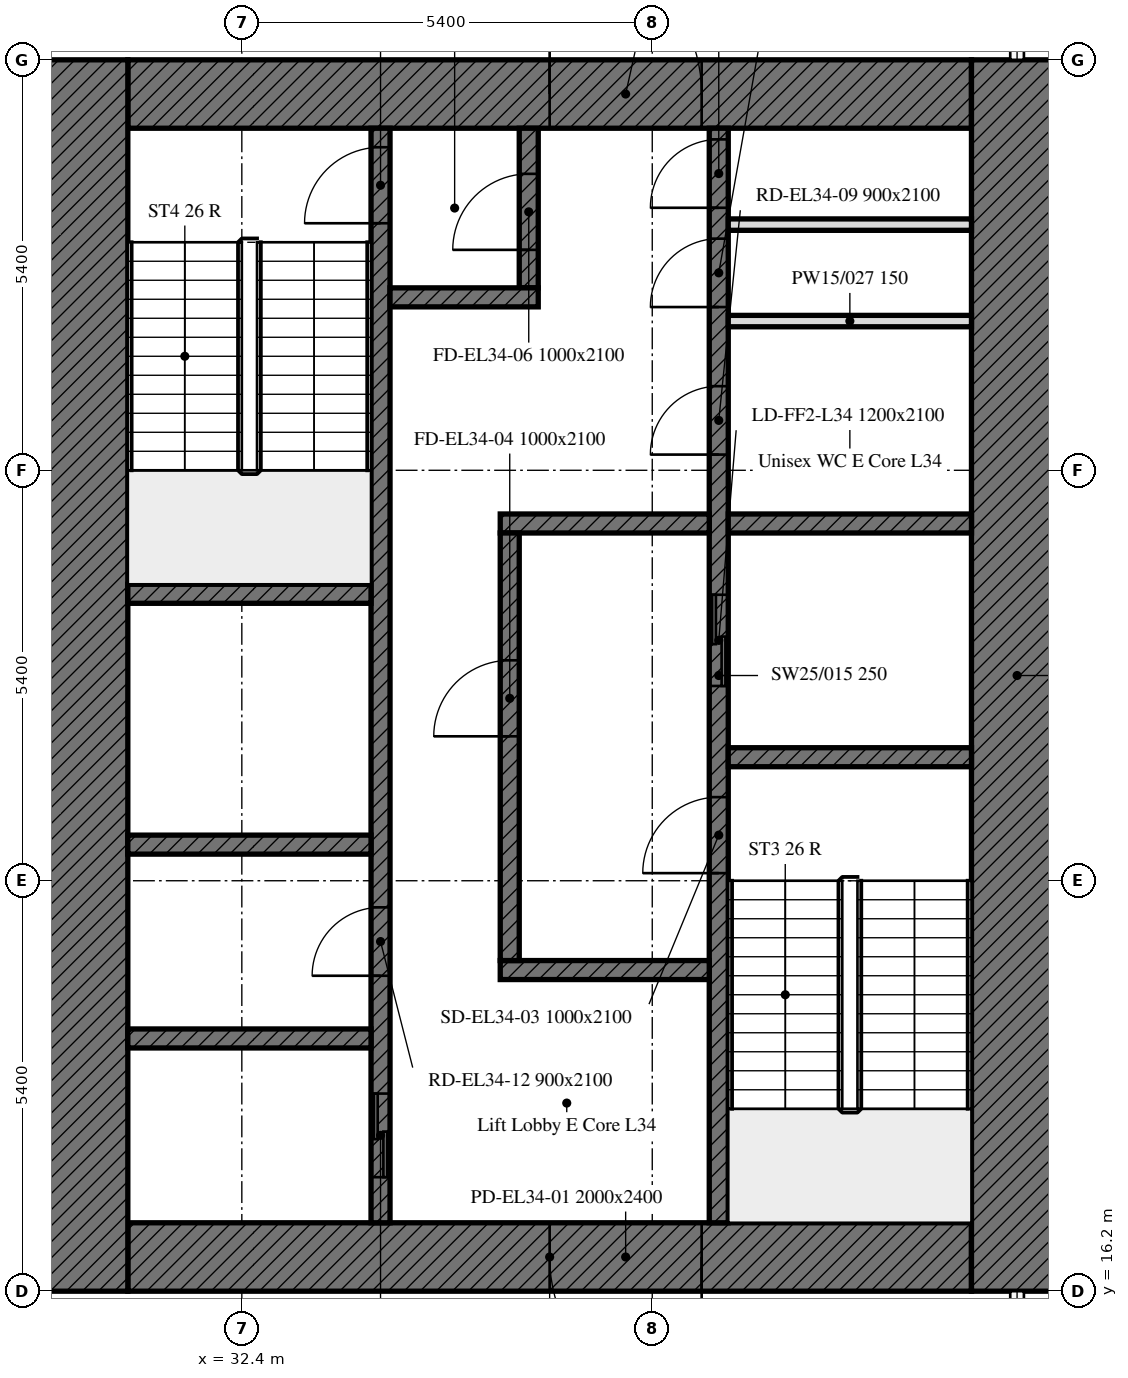
"""IFC4 building model, lengths in metres.
Left out: names, types, materials, properties, quantities, classifications, styles, units other than length and angle.
Written with IfcOpenShell. Run it as: python <this file> out.ifc"""

import sys

from ifc_helpers import new_model, si_unit, direction, frame, frame_2d, origin, place, context, subcontext, project, spatial, rectangle, extrude, element, fill, save


model = new_model("IFC4")
c1 = context("Model", 3, precision=1e-05, world=origin(), true_north=direction((0.0, 1.0)))
c2 = subcontext(c1, "Body", "Model", "MODEL_VIEW")
j1 = project(units=[si_unit("LENGTHUNIT", "METRE"), si_unit("PLANEANGLEUNIT", "RADIAN")], contexts=[c1])
p1 = place(None, origin())
s1 = spatial("IfcSite", under=j1, at=p1, CompositionType="ELEMENT")
p2 = place(p1, origin())
s2 = spatial("IfcBuilding", under=s1, at=p2, CompositionType="ELEMENT")
p3 = place(p2, frame((0.0, 0.0, 148.0)))
s3 = spatial("IfcBuildingStorey", under=s2, at=p3, CompositionType="ELEMENT", Elevation=148.0)
p4 = place(p3, frame((42.0, 16.65, 0.0), z_axis=(0.0, 0.0, 1.0), x_axis=(-1.0, 0.0, 0.0)))
e1 = element("IfcWall", 1, at=p4, inside=s3, PredefinedType="SOLIDWALL", context=c2, shape_type="SweptSolid", body=[
    extrude(rectangle(XDim=11.1, YDim=0.9, at=frame_2d((5.55, 0.0))), origin(), (0.0, 0.0, 1.0), 4.5),
])
p5 = place(p4, frame((3.55, 0.0, 0.0)))
e2 = element("IfcOpeningElement", 2, at=p5, cuts=e1, PredefinedType="OPENING", context=c2, shape_type="SweptSolid", body=[
    extrude(rectangle(XDim=2.0, YDim=2.4, at=frame_2d((1.0, 1.2))), frame((0.0, 0.45, 0.0), z_axis=(0.0, -1.0, 0.0), x_axis=(1.0, 0.0, 0.0)), (0.0, 0.0, 1.0), 0.9),
])
p6 = place(p3, frame((30.9, 31.95, 0.0), z_axis=(0.0, 0.0, 1.0), x_axis=(1.0, 0.0, 0.0)))
e3 = element("IfcWall", 3, at=p6, inside=s3, PredefinedType="SOLIDWALL", context=c2, shape_type="SweptSolid", body=[
    extrude(rectangle(XDim=11.1, YDim=0.9, at=frame_2d((5.55, 0.0))), origin(), (0.0, 0.0, 1.0), 4.5),
])
p7 = place(p6, frame((5.55, 0.0, 0.0)))
e4 = element("IfcOpeningElement", 4, at=p7, cuts=e3, PredefinedType="OPENING", context=c2, shape_type="SweptSolid", body=[
    extrude(rectangle(XDim=2.0, YDim=2.4, at=frame_2d((1.0, 1.2))), frame((0.0, 0.45, 0.0), z_axis=(0.0, -1.0, 0.0), x_axis=(1.0, 0.0, 0.0)), (0.0, 0.0, 1.0), 0.9),
])
for number, where, z_axis, x_axis in (
    (5, (42.6, 32.4, 0.0), (0.0, 0.0, 1.0), (0.0, -1.0, 0.0)),
    (6, (30.3, 16.2, 0.0), (0.0, 0.0, 1.0), (0.0, 1.0, 0.0)),
):
    element("IfcWall", number, at=place(p3, frame(where, z_axis=z_axis, x_axis=x_axis)), inside=s3, PredefinedType="SOLIDWALL", context=c2, shape_type="SweptSolid", body=[
        extrude(rectangle(XDim=16.2, YDim=1.2, at=frame_2d((8.1, 0.0))), origin(), (0.0, 0.0, 1.0), 4.5),
    ])
p8 = place(p3, frame((38.675, 17.1, 0.0), z_axis=(0.0, 0.0, 1.0), x_axis=(0.0, 1.0, 0.0)))
e7 = element("IfcWall", 7, at=p8, inside=s3, PredefinedType="SOLIDWALL", context=c2, shape_type="SweptSolid", body=[
    extrude(rectangle(XDim=14.4, YDim=0.25, at=frame_2d((7.2, 0.0))), origin(), (0.0, 0.0, 1.0), 4.5),
])
p9 = place(p8, frame((4.6, 0.0, 0.0)))
e8 = element("IfcOpeningElement", 8, at=p9, cuts=e7, PredefinedType="OPENING", context=c2, shape_type="SweptSolid", body=[
    extrude(rectangle(XDim=1.0, YDim=2.1, at=frame_2d((0.5, 1.05))), frame((0.0, 0.125, 0.0), z_axis=(0.0, -1.0, 0.0), x_axis=(1.0, 0.0, 0.0)), (0.0, 0.0, 1.0), 0.25),
])
p10 = place(p8, frame((7.062, 0.0, 0.0)))
e9 = element("IfcOpeningElement", 9, at=p10, cuts=e7, PredefinedType="OPENING", context=c2, shape_type="SweptSolid", body=[
    extrude(rectangle(XDim=1.2, YDim=2.1, at=frame_2d((0.6, 1.05))), frame((0.0, 0.125, 0.0), z_axis=(0.0, -1.0, 0.0), x_axis=(1.0, 0.0, 0.0)), (0.0, 0.0, 1.0), 0.25),
])
p11 = place(p8, frame((10.106, 0.0, 0.0)))
e10 = element("IfcOpeningElement", 10, at=p11, cuts=e7, PredefinedType="OPENING", context=c2, shape_type="SweptSolid", body=[
    extrude(rectangle(XDim=0.9, YDim=2.1, at=frame_2d((0.45, 1.05))), frame((0.0, 0.125, 0.0), z_axis=(0.0, -1.0, 0.0), x_axis=(1.0, 0.0, 0.0)), (0.0, 0.0, 1.0), 0.25),
])
p12 = place(p8, frame((12.048, 0.0, 0.0)))
e11 = element("IfcOpeningElement", 11, at=p12, cuts=e7, PredefinedType="OPENING", context=c2, shape_type="SweptSolid", body=[
    extrude(rectangle(XDim=0.9, YDim=2.1, at=frame_2d((0.45, 1.05))), frame((0.0, 0.125, 0.0), z_axis=(0.0, -1.0, 0.0), x_axis=(1.0, 0.0, 0.0)), (0.0, 0.0, 1.0), 0.25),
])
p13 = place(p8, frame((13.354, 0.0, 0.0)))
e12 = element("IfcOpeningElement", 12, at=p13, cuts=e7, PredefinedType="OPENING", context=c2, shape_type="SweptSolid", body=[
    extrude(rectangle(XDim=0.9, YDim=2.1, at=frame_2d((0.45, 1.05))), frame((0.0, 0.125, 0.0), z_axis=(0.0, -1.0, 0.0), x_axis=(1.0, 0.0, 0.0)), (0.0, 0.0, 1.0), 0.25),
])
p14 = place(p3, frame((34.225, 17.1, 0.0), z_axis=(0.0, 0.0, 1.0), x_axis=(0.0, 1.0, 0.0)))
e13 = element("IfcWall", 13, at=p14, inside=s3, PredefinedType="SOLIDWALL", context=c2, shape_type="SweptSolid", body=[
    extrude(rectangle(XDim=14.4, YDim=0.25, at=frame_2d((7.2, 0.0))), origin(), (0.0, 0.0, 1.0), 4.5),
])
p15 = place(p14, frame((13.15, 0.0, 0.0)))
e14 = element("IfcOpeningElement", 14, at=p15, cuts=e13, PredefinedType="OPENING", context=c2, shape_type="SweptSolid", body=[
    extrude(rectangle(XDim=1.0, YDim=2.1, at=frame_2d((0.5, 1.05))), frame((0.0, 0.125, 0.0), z_axis=(0.0, -1.0, 0.0), x_axis=(1.0, 0.0, 0.0)), (0.0, 0.0, 1.0), 0.25),
])
p16 = place(p14, frame((0.6, 0.0, 0.0)))
e15 = element("IfcOpeningElement", 15, at=p16, cuts=e13, PredefinedType="OPENING", context=c2, shape_type="SweptSolid", body=[
    extrude(rectangle(XDim=1.1, YDim=2.1, at=frame_2d((0.55, 1.05))), frame((0.0, 0.125, 0.0), z_axis=(0.0, -1.0, 0.0), x_axis=(1.0, 0.0, 0.0)), (0.0, 0.0, 1.0), 0.25),
])
p17 = place(p14, frame((3.25, 0.0, 0.0)))
e16 = element("IfcOpeningElement", 16, at=p17, cuts=e13, PredefinedType="OPENING", context=c2, shape_type="SweptSolid", body=[
    extrude(rectangle(XDim=0.9, YDim=2.1, at=frame_2d((0.45, 1.05))), frame((0.0, 0.125, 0.0), z_axis=(0.0, -1.0, 0.0), x_axis=(1.0, 0.0, 0.0)), (0.0, 0.0, 1.0), 0.25),
])
p18 = place(p3, frame((38.8, 23.225, 0.0), z_axis=(0.0, 0.0, 1.0), x_axis=(1.0, 0.0, 0.0)))
e17 = element("IfcWall", 17, at=p18, inside=s3, PredefinedType="SOLIDWALL", context=c2, shape_type="SweptSolid", body=[
    extrude(rectangle(XDim=3.2, YDim=0.25, at=frame_2d((1.6, 0.0))), origin(), (0.0, 0.0, 1.0), 4.5),
])
for number, where, z_axis, x_axis in (
    (18, (30.9, 25.375, 0.0), (0.0, 0.0, 1.0), (1.0, 0.0, 0.0)),
    (19, (30.9, 22.075, 0.0), (0.0, 0.0, 1.0), (1.0, 0.0, 0.0)),
):
    element("IfcWall", number, at=place(p3, frame(where, z_axis=z_axis, x_axis=x_axis)), inside=s3, PredefinedType="SOLIDWALL", context=c2, shape_type="SweptSolid", body=[
        extrude(rectangle(XDim=3.2, YDim=0.25, at=frame_2d((1.6, 0.0))), origin(), (0.0, 0.0, 1.0), 4.5),
    ])
p19 = place(p3, frame((38.8, 26.3, 0.0), z_axis=(0.0, 0.0, 1.0), x_axis=(1.0, 0.0, 0.0)))
e20 = element("IfcWall", 20, at=p19, inside=s3, PredefinedType="SOLIDWALL", context=c2, shape_type="SweptSolid", body=[
    extrude(rectangle(XDim=3.2, YDim=0.25, at=frame_2d((1.6, 0.0))), origin(), (0.0, 0.0, 1.0), 4.5),
])
for number, where, z_axis, x_axis in (
    (21, (35.8, 26.3, 0.0), (0.0, 0.0, 1.0), (1.0, 0.0, 0.0)),
    (22, (35.8, 20.425, 0.0), (0.0, 0.0, 1.0), (1.0, 0.0, 0.0)),
):
    element("IfcWall", number, at=place(p3, frame(where, z_axis=z_axis, x_axis=x_axis)), inside=s3, PredefinedType="SOLIDWALL", context=c2, shape_type="SweptSolid", body=[
        extrude(rectangle(XDim=2.75, YDim=0.25, at=frame_2d((1.375, 0.0))), origin(), (0.0, 0.0, 1.0), 4.5),
    ])
p20 = place(p3, frame((36.175, 29.4, 0.0), z_axis=(0.0, 0.0, 1.0), x_axis=(0.0, 1.0, 0.0)))
e23 = element("IfcWall", 23, at=p20, inside=s3, PredefinedType="SOLIDWALL", context=c2, shape_type="SweptSolid", body=[
    extrude(rectangle(XDim=2.1, YDim=0.25, at=frame_2d((1.05, 0.0))), origin(), (0.0, 0.0, 1.0), 4.5),
])
p21 = place(p20, frame((0.5, 0.0, 0.0)))
e24 = element("IfcOpeningElement", 24, at=p21, cuts=e23, PredefinedType="OPENING", context=c2, shape_type="SweptSolid", body=[
    extrude(rectangle(XDim=1.0, YDim=2.1, at=frame_2d((0.5, 1.05))), frame((0.0, 0.125, 0.0), z_axis=(0.0, -1.0, 0.0), x_axis=(1.0, 0.0, 0.0)), (0.0, 0.0, 1.0), 0.25),
])
p22 = place(p3, frame((34.35, 29.275, 0.0), z_axis=(0.0, 0.0, 1.0), x_axis=(1.0, 0.0, 0.0)))
e25 = element("IfcWall", 25, at=p22, inside=s3, PredefinedType="SOLIDWALL", context=c2, shape_type="SweptSolid", body=[
    extrude(rectangle(XDim=1.95, YDim=0.25, at=frame_2d((0.975, 0.0))), origin(), (0.0, 0.0, 1.0), 4.5),
])
p23 = place(p3, frame((35.925, 20.55, 0.0), z_axis=(0.0, 0.0, 1.0), x_axis=(0.0, 1.0, 0.0)))
e26 = element("IfcWall", 26, at=p23, inside=s3, PredefinedType="SOLIDWALL", context=c2, shape_type="SweptSolid", body=[
    extrude(rectangle(XDim=5.625, YDim=0.25, at=frame_2d((2.812, 0.0))), origin(), (0.0, 0.0, 1.0), 4.5),
])
p24 = place(p23, frame((2.95, 0.0, 0.0)))
e27 = element("IfcOpeningElement", 27, at=p24, cuts=e26, PredefinedType="OPENING", context=c2, shape_type="SweptSolid", body=[
    extrude(rectangle(XDim=1.0, YDim=2.1, at=frame_2d((0.5, 1.05))), frame((0.0, 0.125, 0.0), z_axis=(0.0, -1.0, 0.0), x_axis=(1.0, 0.0, 0.0)), (0.0, 0.0, 1.0), 0.25),
])
p25 = place(p3, frame((30.9, 19.525, 0.0), z_axis=(0.0, 0.0, 1.0), x_axis=(1.0, 0.0, 0.0)))
e28 = element("IfcWall", 28, at=p25, inside=s3, PredefinedType="SOLIDWALL", context=c2, shape_type="SweptSolid", body=[
    extrude(rectangle(XDim=3.2, YDim=0.25, at=frame_2d((1.6, 0.0))), origin(), (0.0, 0.0, 1.0), 4.5),
])
for number, where, z_axis, x_axis in (
    (29, (38.8, 28.963, 0.0), (0.0, 0.0, 1.0), (1.0, 0.0, 0.0)),
    (30, (38.8, 30.232, 0.0), (0.0, 0.0, 1.0), (1.0, 0.0, 0.0)),
):
    element("IfcWall", number, at=place(p3, frame(where, z_axis=z_axis, x_axis=x_axis)), inside=s3, PredefinedType="PARTITIONING", context=c2, shape_type="SweptSolid", body=[
        extrude(rectangle(XDim=3.2, YDim=0.15, at=frame_2d((1.6, 0.0))), origin(), (0.0, 0.0, 1.0), 4.5),
    ])
p26 = place(p5, origin())
e31 = element("IfcDoor", 31, at=p26, inside=s3, OperationType="DOUBLE_DOOR_SINGLE_SWING", PredefinedType="DOOR", context=c2, shape_type="SweptSolid", body=[
    extrude(rectangle(XDim=2.0, YDim=2.4, at=frame_2d((1.0, 1.2))), frame((0.0, 0.025, 0.0), z_axis=(0.0, -1.0, 0.0), x_axis=(1.0, 0.0, 0.0)), (0.0, 0.0, 1.0), 0.05),
])
fill(e2, e31)
p27 = place(p7, origin())
e32 = element("IfcDoor", 32, at=p27, inside=s3, OperationType="DOUBLE_DOOR_SINGLE_SWING", PredefinedType="DOOR", context=c2, shape_type="SweptSolid", body=[
    extrude(rectangle(XDim=2.0, YDim=2.4, at=frame_2d((1.0, 1.2))), frame((0.0, 0.025, 0.0), z_axis=(0.0, -1.0, 0.0), x_axis=(1.0, 0.0, 0.0)), (0.0, 0.0, 1.0), 0.05),
])
fill(e4, e32)
p28 = place(p9, origin())
e33 = element("IfcDoor", 33, at=p28, inside=s3, OperationType="SINGLE_SWING_LEFT", PredefinedType="DOOR", context=c2, shape_type="SweptSolid", body=[
    extrude(rectangle(XDim=1.0, YDim=2.1, at=frame_2d((0.5, 1.05))), frame((0.0, 0.025, 0.0), z_axis=(0.0, -1.0, 0.0), x_axis=(1.0, 0.0, 0.0)), (0.0, 0.0, 1.0), 0.05),
])
fill(e8, e33)
p29 = place(p24, origin())
e34 = element("IfcDoor", 34, at=p29, inside=s3, OperationType="SINGLE_SWING_LEFT", PredefinedType="DOOR", context=c2, shape_type="SweptSolid", body=[
    extrude(rectangle(XDim=1.0, YDim=2.1, at=frame_2d((0.5, 1.05))), frame((0.0, 0.025, 0.0), z_axis=(0.0, -1.0, 0.0), x_axis=(1.0, 0.0, 0.0)), (0.0, 0.0, 1.0), 0.05),
])
fill(e27, e34)
p30 = place(p15, origin())
e35 = element("IfcDoor", 35, at=p30, inside=s3, OperationType="SINGLE_SWING_LEFT", PredefinedType="DOOR", context=c2, shape_type="SweptSolid", body=[
    extrude(rectangle(XDim=1.0, YDim=2.1, at=frame_2d((0.5, 1.05))), frame((0.0, 0.025, 0.0), z_axis=(0.0, -1.0, 0.0), x_axis=(1.0, 0.0, 0.0)), (0.0, 0.0, 1.0), 0.05),
])
fill(e14, e35)
p31 = place(p21, origin())
e36 = element("IfcDoor", 36, at=p31, inside=s3, OperationType="SINGLE_SWING_LEFT", PredefinedType="DOOR", context=c2, shape_type="SweptSolid", body=[
    extrude(rectangle(XDim=1.0, YDim=2.1, at=frame_2d((0.5, 1.05))), frame((0.0, 0.025, 0.0), z_axis=(0.0, -1.0, 0.0), x_axis=(1.0, 0.0, 0.0)), (0.0, 0.0, 1.0), 0.05),
])
fill(e24, e36)
p32 = place(p10, origin())
e37 = element("IfcDoor", 37, at=p32, inside=s3, OperationType="DOUBLE_DOOR_SLIDING", PredefinedType="DOOR", context=c2, shape_type="SweptSolid", body=[
    extrude(rectangle(XDim=1.2, YDim=2.1, at=frame_2d((0.6, 1.05))), frame((0.0, 0.025, 0.0), z_axis=(0.0, -1.0, 0.0), x_axis=(1.0, 0.0, 0.0)), (0.0, 0.0, 1.0), 0.05),
])
fill(e9, e37)
p33 = place(p16, origin())
e38 = element("IfcDoor", 38, at=p33, inside=s3, OperationType="DOUBLE_DOOR_SLIDING", PredefinedType="DOOR", context=c2, shape_type="SweptSolid", body=[
    extrude(rectangle(XDim=1.1, YDim=2.1, at=frame_2d((0.55, 1.05))), frame((0.0, 0.025, 0.0), z_axis=(0.0, -1.0, 0.0), x_axis=(1.0, 0.0, 0.0)), (0.0, 0.0, 1.0), 0.05),
])
fill(e15, e38)
p34 = place(p11, origin())
e39 = element("IfcDoor", 39, at=p34, inside=s3, OperationType="SINGLE_SWING_LEFT", PredefinedType="DOOR", context=c2, shape_type="SweptSolid", body=[
    extrude(rectangle(XDim=0.9, YDim=2.1, at=frame_2d((0.45, 1.05))), frame((0.0, 0.025, 0.0), z_axis=(0.0, -1.0, 0.0), x_axis=(1.0, 0.0, 0.0)), (0.0, 0.0, 1.0), 0.05),
])
fill(e10, e39)
p35 = place(p12, origin())
e40 = element("IfcDoor", 40, at=p35, inside=s3, OperationType="SINGLE_SWING_LEFT", PredefinedType="DOOR", context=c2, shape_type="SweptSolid", body=[
    extrude(rectangle(XDim=0.9, YDim=2.1, at=frame_2d((0.45, 1.05))), frame((0.0, 0.025, 0.0), z_axis=(0.0, -1.0, 0.0), x_axis=(1.0, 0.0, 0.0)), (0.0, 0.0, 1.0), 0.05),
])
fill(e11, e40)
p36 = place(p13, origin())
e41 = element("IfcDoor", 41, at=p36, inside=s3, OperationType="SINGLE_SWING_LEFT", PredefinedType="DOOR", context=c2, shape_type="SweptSolid", body=[
    extrude(rectangle(XDim=0.9, YDim=2.1, at=frame_2d((0.45, 1.05))), frame((0.0, 0.025, 0.0), z_axis=(0.0, -1.0, 0.0), x_axis=(1.0, 0.0, 0.0)), (0.0, 0.0, 1.0), 0.05),
])
fill(e12, e41)
p37 = place(p17, origin())
e42 = element("IfcDoor", 42, at=p37, inside=s3, OperationType="SINGLE_SWING_LEFT", PredefinedType="DOOR", context=c2, shape_type="SweptSolid", body=[
    extrude(rectangle(XDim=0.9, YDim=2.1, at=frame_2d((0.45, 1.05))), frame((0.0, 0.025, 0.0), z_axis=(0.0, -1.0, 0.0), x_axis=(1.0, 0.0, 0.0)), (0.0, 0.0, 1.0), 0.05),
])
fill(e16, e42)
save(model, sys.argv[1])
